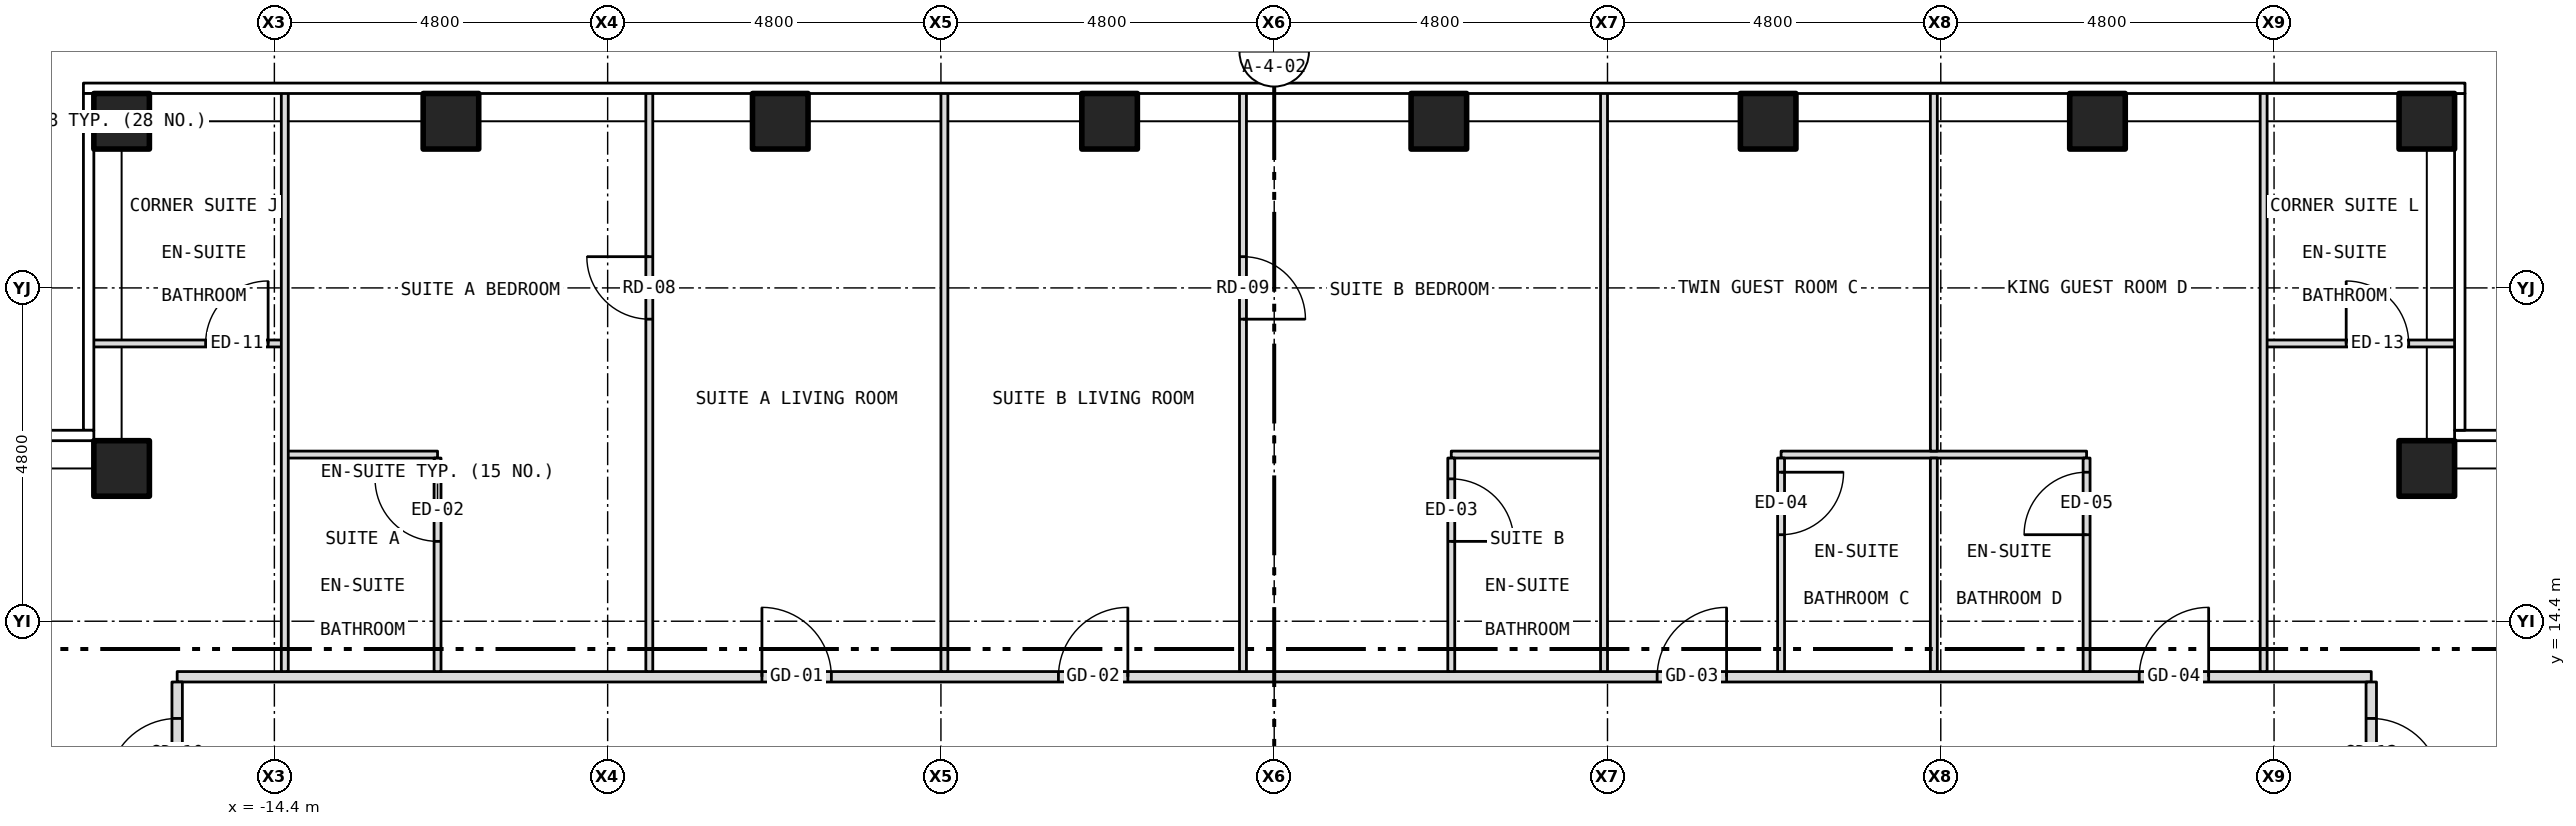
"""IFC4 building model, lengths in metres.
Left out: names, types, materials, properties, quantities, classifications, styles, units other than length and angle.
Written with IfcOpenShell. Run it as: python <this file> out.ifc"""

import sys

from ifc_helpers import new_model, si_unit, direction, frame, frame_2d, origin, origin_2d, place, context, subcontext, project, spatial, rectangle, hollow_rectangle, extrude, element, fill, save


model = new_model("IFC4")
c1 = context("Model", 3, precision=1e-05, world=origin(), true_north=direction((0.0, 1.0)))
c2 = subcontext(c1, "Body", "Model", "MODEL_VIEW")
j1 = project(units=[si_unit("LENGTHUNIT", "METRE"), si_unit("PLANEANGLEUNIT", "RADIAN")], contexts=[c1])
p1 = place(None, origin())
s1 = spatial("IfcSite", under=j1, at=p1, CompositionType="ELEMENT")
p2 = place(p1, origin())
s2 = spatial("IfcBuilding", under=s1, at=p2, CompositionType="ELEMENT")
p3 = place(p2, frame((0.0, 0.0, 162.0)))
s3 = spatial("IfcBuildingStorey", under=s2, at=p3, CompositionType="ELEMENT", Elevation=162.0)
for number, where, z_axis, x_axis in (
    (1, (-16.6, 21.6, -0.15), (0.0, 0.0, 1.0), (1.0, 0.0, 0.0)),
    (2, (-11.857, 21.6, -0.15), (0.0, 0.0, 1.0), (1.0, 0.0, 0.0)),
    (3, (-7.114, 21.6, -0.15), (0.0, 0.0, 1.0), (1.0, 0.0, 0.0)),
    (4, (-2.371, 21.6, -0.15), (0.0, 0.0, 1.0), (1.0, 0.0, 0.0)),
    (5, (2.371, 21.6, -0.15), (0.0, 0.0, 1.0), (1.0, 0.0, 0.0)),
    (6, (7.114, 21.6, -0.15), (0.0, 0.0, 1.0), (1.0, 0.0, 0.0)),
    (7, (11.857, 21.6, -0.15), (0.0, 0.0, 1.0), (1.0, 0.0, 0.0)),
    (8, (16.6, 21.6, -0.15), (0.0, 0.0, 1.0), (1.0, 0.0, 0.0)),
    (9, (-16.6, 16.6, -0.15), (0.0, 0.0, 1.0), (1.0, 0.0, 0.0)),
    (10, (16.6, 16.6, -0.15), (0.0, 0.0, 1.0), (1.0, 0.0, 0.0)),
):
    element("IfcColumn", number, at=place(p3, frame(where, z_axis=z_axis, x_axis=x_axis)), inside=s3, PredefinedType="COLUMN", context=c2, shape_type="SweptSolid", body=[
        extrude(hollow_rectangle(XDim=0.8, YDim=0.8, WallThickness=0.045, at=origin_2d()), origin(), (0.0, 0.0, 1.0), 3.5),
    ])
p4 = place(p3, frame((-15.8, 13.6, 0.0), z_axis=(0.0, 0.0, 1.0), x_axis=(1.0, 0.0, 0.0)))
e11 = element("IfcWall", 11, at=p4, inside=s3, PredefinedType="PARTITIONING", context=c2, shape_type="SweptSolid", body=[
    extrude(rectangle(XDim=31.6, YDim=0.15, at=frame_2d((15.8, 0.0))), origin(), (0.0, 0.0, 1.0), 3.35),
])
p5 = place(p4, frame((8.422, 0.0, 0.0)))
e12 = element("IfcOpeningElement", 12, at=p5, cuts=e11, PredefinedType="OPENING", context=c2, shape_type="SweptSolid", body=[
    extrude(rectangle(XDim=1.0, YDim=2.1, at=frame_2d((0.5, 1.05))), frame((0.0, 0.087, 0.0), z_axis=(0.0, -1.0, 0.0), x_axis=(1.0, 0.0, 0.0)), (0.0, 0.0, 1.0), 0.174),
])
p6 = place(p4, frame((12.692, 0.0, 0.0)))
e13 = element("IfcOpeningElement", 13, at=p6, cuts=e11, PredefinedType="OPENING", context=c2, shape_type="SweptSolid", body=[
    extrude(rectangle(XDim=1.0, YDim=2.1, at=frame_2d((0.5, 1.05))), frame((0.0, 0.087, 0.0), z_axis=(0.0, -1.0, 0.0), x_axis=(1.0, 0.0, 0.0)), (0.0, 0.0, 1.0), 0.174),
])
p7 = place(p4, frame((21.315, 0.0, 0.0)))
e14 = element("IfcOpeningElement", 14, at=p7, cuts=e11, PredefinedType="OPENING", context=c2, shape_type="SweptSolid", body=[
    extrude(rectangle(XDim=1.0, YDim=2.1, at=frame_2d((0.5, 1.05))), frame((0.0, 0.087, 0.0), z_axis=(0.0, -1.0, 0.0), x_axis=(1.0, 0.0, 0.0)), (0.0, 0.0, 1.0), 0.174),
])
p8 = place(p4, frame((28.258, 0.0, 0.0)))
e15 = element("IfcOpeningElement", 15, at=p8, cuts=e11, PredefinedType="OPENING", context=c2, shape_type="SweptSolid", body=[
    extrude(rectangle(XDim=1.0, YDim=2.1, at=frame_2d((0.5, 1.05))), frame((0.0, 0.087, 0.0), z_axis=(0.0, -1.0, 0.0), x_axis=(1.0, 0.0, 0.0)), (0.0, 0.0, 1.0), 0.174),
])
for number, where, z_axis, x_axis in (
    (16, (-14.25, 16.8, 0.0), (0.0, 0.0, 1.0), (1.0, 0.0, 0.0)),
    (17, (2.55, 16.8, 0.0), (0.0, 0.0, 1.0), (1.0, 0.0, 0.0)),
):
    element("IfcWall", number, at=place(p3, frame(where, z_axis=z_axis, x_axis=x_axis)), inside=s3, PredefinedType="PARTITIONING", context=c2, shape_type="SweptSolid", body=[
        extrude(rectangle(XDim=2.2, YDim=0.1, at=frame_2d((1.1, 0.0))), origin(), (0.0, 0.0, 1.0), 3.35),
    ])
p9 = place(p3, frame((7.3, 16.8, 0.0), z_axis=(0.0, 0.0, 1.0), x_axis=(1.0, 0.0, 0.0)))
e18 = element("IfcWall", 18, at=p9, inside=s3, PredefinedType="PARTITIONING", context=c2, shape_type="SweptSolid", body=[
    extrude(rectangle(XDim=4.4, YDim=0.1, at=frame_2d((2.2, 0.0))), origin(), (0.0, 0.0, 1.0), 3.35),
])
p10 = place(p3, frame((-17.03, 18.4, 0.0), z_axis=(0.0, 0.0, 1.0), x_axis=(1.0, 0.0, 0.0)))
e19 = element("IfcWall", 19, at=p10, inside=s3, PredefinedType="PARTITIONING", context=c2, shape_type="SweptSolid", body=[
    extrude(rectangle(XDim=2.78, YDim=0.1, at=frame_2d((1.39, 0.0))), origin(), (0.0, 0.0, 1.0), 3.35),
])
p11 = place(p10, frame((1.64, 0.0, 0.0)))
e20 = element("IfcOpeningElement", 20, at=p11, cuts=e19, PredefinedType="OPENING", context=c2, shape_type="SweptSolid", body=[
    extrude(rectangle(XDim=0.9, YDim=2.1, at=frame_2d((0.45, 1.05))), frame((0.0, 0.062, 0.0), z_axis=(0.0, -1.0, 0.0), x_axis=(1.0, 0.0, 0.0)), (0.0, 0.0, 1.0), 0.124),
])
p12 = place(p3, frame((14.25, 18.4, 0.0), z_axis=(0.0, 0.0, 1.0), x_axis=(1.0, 0.0, 0.0)))
e21 = element("IfcWall", 21, at=p12, inside=s3, PredefinedType="PARTITIONING", context=c2, shape_type="SweptSolid", body=[
    extrude(rectangle(XDim=2.78, YDim=0.1, at=frame_2d((1.39, 0.0))), origin(), (0.0, 0.0, 1.0), 3.35),
])
p13 = place(p12, frame((1.189, 0.0, 0.0)))
e22 = element("IfcOpeningElement", 22, at=p13, cuts=e21, PredefinedType="OPENING", context=c2, shape_type="SweptSolid", body=[
    extrude(rectangle(XDim=0.9, YDim=2.1, at=frame_2d((0.45, 1.05))), frame((0.0, 0.062, 0.0), z_axis=(0.0, -1.0, 0.0), x_axis=(1.0, 0.0, 0.0)), (0.0, 0.0, 1.0), 0.124),
])
p14 = place(p3, frame((-15.8, 10.92, 0.0), z_axis=(0.0, 0.0, 1.0), x_axis=(0.0, 1.0, 0.0)))
e23 = element("IfcWall", 23, at=p14, inside=s3, PredefinedType="PARTITIONING", context=c2, shape_type="SweptSolid", body=[
    extrude(rectangle(XDim=2.605, YDim=0.15, at=frame_2d((1.302, 0.0))), origin(), (0.0, 0.0, 1.0), 3.35),
])
p15 = place(p14, frame((1.08, 0.0, 0.0)))
e24 = element("IfcOpeningElement", 24, at=p15, cuts=e23, PredefinedType="OPENING", context=c2, shape_type="SweptSolid", body=[
    extrude(rectangle(XDim=1.0, YDim=2.1, at=frame_2d((0.5, 1.05))), frame((0.0, 0.087, 0.0), z_axis=(0.0, -1.0, 0.0), x_axis=(1.0, 0.0, 0.0)), (0.0, 0.0, 1.0), 0.174),
])
p16 = place(p3, frame((-14.25, 13.675, 0.0), z_axis=(0.0, 0.0, 1.0), x_axis=(0.0, 1.0, 0.0)))
e25 = element("IfcWall", 25, at=p16, inside=s3, PredefinedType="PARTITIONING", context=c2, shape_type="SweptSolid", body=[
    extrude(rectangle(XDim=8.355, YDim=0.1, at=frame_2d((4.177, 0.0))), origin(), (0.0, 0.0, 1.0), 2.817),
])
p17 = place(p3, frame((-12.05, 13.675, 0.0), z_axis=(0.0, 0.0, 1.0), x_axis=(0.0, 1.0, 0.0)))
e26 = element("IfcWall", 26, at=p17, inside=s3, PredefinedType="PARTITIONING", context=c2, shape_type="SweptSolid", body=[
    extrude(rectangle(XDim=3.075, YDim=0.1, at=frame_2d((1.538, 0.0))), origin(), (0.0, 0.0, 1.0), 3.35),
])
p18 = place(p17, frame((1.875, 0.0, 0.0)))
e27 = element("IfcOpeningElement", 27, at=p18, cuts=e26, PredefinedType="OPENING", context=c2, shape_type="SweptSolid", body=[
    extrude(rectangle(XDim=0.9, YDim=2.1, at=frame_2d((0.45, 1.05))), frame((0.0, 0.062, 0.0), z_axis=(0.0, -1.0, 0.0), x_axis=(1.0, 0.0, 0.0)), (0.0, 0.0, 1.0), 0.124),
])
p19 = place(p3, frame((-9.0, 13.675, 0.0), z_axis=(0.0, 0.0, 1.0), x_axis=(0.0, 1.0, 0.0)))
e28 = element("IfcWall", 28, at=p19, inside=s3, PredefinedType="PARTITIONING", context=c2, shape_type="SweptSolid", body=[
    extrude(rectangle(XDim=8.355, YDim=0.1, at=frame_2d((4.177, 0.0))), origin(), (0.0, 0.0, 1.0), 3.35),
])
p20 = place(p19, frame((5.075, 0.0, 0.0)))
e29 = element("IfcOpeningElement", 29, at=p20, cuts=e28, PredefinedType="OPENING", context=c2, shape_type="SweptSolid", body=[
    extrude(rectangle(XDim=0.9, YDim=2.1, at=frame_2d((0.45, 1.05))), frame((0.0, 0.062, 0.0), z_axis=(0.0, -1.0, 0.0), x_axis=(1.0, 0.0, 0.0)), (0.0, 0.0, 1.0), 0.124),
])
p21 = place(p3, frame((-4.75, 13.675, 0.0), z_axis=(0.0, 0.0, 1.0), x_axis=(0.0, 1.0, 0.0)))
e30 = element("IfcWall", 30, at=p21, inside=s3, PredefinedType="PARTITIONING", context=c2, shape_type="SweptSolid", body=[
    extrude(rectangle(XDim=8.355, YDim=0.1, at=frame_2d((4.177, 0.0))), origin(), (0.0, 0.0, 1.0), 2.817),
])
p22 = place(p3, frame((-0.45, 13.675, 0.0), z_axis=(0.0, 0.0, 1.0), x_axis=(0.0, 1.0, 0.0)))
e31 = element("IfcWall", 31, at=p22, inside=s3, PredefinedType="PARTITIONING", context=c2, shape_type="SweptSolid", body=[
    extrude(rectangle(XDim=8.355, YDim=0.1, at=frame_2d((4.177, 0.0))), origin(), (0.0, 0.0, 1.0), 3.35),
])
p23 = place(p22, frame((5.075, 0.0, 0.0)))
e32 = element("IfcOpeningElement", 32, at=p23, cuts=e31, PredefinedType="OPENING", context=c2, shape_type="SweptSolid", body=[
    extrude(rectangle(XDim=0.9, YDim=2.1, at=frame_2d((0.45, 1.05))), frame((0.0, 0.062, 0.0), z_axis=(0.0, -1.0, 0.0), x_axis=(1.0, 0.0, 0.0)), (0.0, 0.0, 1.0), 0.124),
])
p24 = place(p3, frame((2.55, 13.675, 0.0), z_axis=(0.0, 0.0, 1.0), x_axis=(0.0, 1.0, 0.0)))
e33 = element("IfcWall", 33, at=p24, inside=s3, PredefinedType="PARTITIONING", context=c2, shape_type="SweptSolid", body=[
    extrude(rectangle(XDim=3.075, YDim=0.1, at=frame_2d((1.538, 0.0))), origin(), (0.0, 0.0, 1.0), 3.35),
])
p25 = place(p24, frame((1.875, 0.0, 0.0)))
e34 = element("IfcOpeningElement", 34, at=p25, cuts=e33, PredefinedType="OPENING", context=c2, shape_type="SweptSolid", body=[
    extrude(rectangle(XDim=0.9, YDim=2.1, at=frame_2d((0.45, 1.05))), frame((0.0, 0.062, 0.0), z_axis=(0.0, -1.0, 0.0), x_axis=(1.0, 0.0, 0.0)), (0.0, 0.0, 1.0), 0.124),
])
p26 = place(p3, frame((4.75, 13.675, 0.0), z_axis=(0.0, 0.0, 1.0), x_axis=(0.0, 1.0, 0.0)))
e35 = element("IfcWall", 35, at=p26, inside=s3, PredefinedType="PARTITIONING", context=c2, shape_type="SweptSolid", body=[
    extrude(rectangle(XDim=8.355, YDim=0.1, at=frame_2d((4.177, 0.0))), origin(), (0.0, 0.0, 1.0), 2.817),
])
p27 = place(p3, frame((7.3, 13.675, 0.0), z_axis=(0.0, 0.0, 1.0), x_axis=(0.0, 1.0, 0.0)))
e36 = element("IfcWall", 36, at=p27, inside=s3, PredefinedType="PARTITIONING", context=c2, shape_type="SweptSolid", body=[
    extrude(rectangle(XDim=3.075, YDim=0.1, at=frame_2d((1.538, 0.0))), origin(), (0.0, 0.0, 1.0), 3.35),
])
p28 = place(p27, frame((1.971, 0.0, 0.0)))
e37 = element("IfcOpeningElement", 37, at=p28, cuts=e36, PredefinedType="OPENING", context=c2, shape_type="SweptSolid", body=[
    extrude(rectangle(XDim=0.9, YDim=2.1, at=frame_2d((0.45, 1.05))), frame((0.0, 0.062, 0.0), z_axis=(0.0, -1.0, 0.0), x_axis=(1.0, 0.0, 0.0)), (0.0, 0.0, 1.0), 0.124),
])
p29 = place(p3, frame((9.5, 13.675, 0.0), z_axis=(0.0, 0.0, 1.0), x_axis=(0.0, 1.0, 0.0)))
e38 = element("IfcWall", 38, at=p29, inside=s3, PredefinedType="PARTITIONING", context=c2, shape_type="SweptSolid", body=[
    extrude(rectangle(XDim=3.075, YDim=0.1, at=frame_2d((1.538, 0.0))), origin(), (0.0, 0.0, 1.0), 2.728),
])
p30 = place(p3, frame((9.5, 16.85, 0.0), z_axis=(0.0, 0.0, 1.0), x_axis=(0.0, 1.0, 0.0)))
e39 = element("IfcWall", 39, at=p30, inside=s3, PredefinedType="PARTITIONING", context=c2, shape_type="SweptSolid", body=[
    extrude(rectangle(XDim=5.18, YDim=0.1, at=frame_2d((2.59, 0.0))), origin(), (0.0, 0.0, 1.0), 2.728),
])
p31 = place(p3, frame((11.7, 13.675, 0.0), z_axis=(0.0, 0.0, 1.0), x_axis=(0.0, 1.0, 0.0)))
e40 = element("IfcWall", 40, at=p31, inside=s3, PredefinedType="PARTITIONING", context=c2, shape_type="SweptSolid", body=[
    extrude(rectangle(XDim=3.075, YDim=0.1, at=frame_2d((1.538, 0.0))), origin(), (0.0, 0.0, 1.0), 3.35),
])
p32 = place(p31, frame((1.971, 0.0, 0.0)))
e41 = element("IfcOpeningElement", 41, at=p32, cuts=e40, PredefinedType="OPENING", context=c2, shape_type="SweptSolid", body=[
    extrude(rectangle(XDim=0.9, YDim=2.1, at=frame_2d((0.45, 1.05))), frame((0.0, 0.062, 0.0), z_axis=(0.0, -1.0, 0.0), x_axis=(1.0, 0.0, 0.0)), (0.0, 0.0, 1.0), 0.124),
])
p33 = place(p3, frame((14.25, 13.675, 0.0), z_axis=(0.0, 0.0, 1.0), x_axis=(0.0, 1.0, 0.0)))
e42 = element("IfcWall", 42, at=p33, inside=s3, PredefinedType="PARTITIONING", context=c2, shape_type="SweptSolid", body=[
    extrude(rectangle(XDim=8.355, YDim=0.1, at=frame_2d((4.177, 0.0))), origin(), (0.0, 0.0, 1.0), 2.817),
])
p34 = place(p3, frame((15.8, 10.92, 0.0), z_axis=(0.0, 0.0, 1.0), x_axis=(0.0, 1.0, 0.0)))
e43 = element("IfcWall", 43, at=p34, inside=s3, PredefinedType="PARTITIONING", context=c2, shape_type="SweptSolid", body=[
    extrude(rectangle(XDim=2.605, YDim=0.15, at=frame_2d((1.302, 0.0))), origin(), (0.0, 0.0, 1.0), 3.35),
])
p35 = place(p34, frame((1.08, 0.0, 0.0)))
e44 = element("IfcOpeningElement", 44, at=p35, cuts=e43, PredefinedType="OPENING", context=c2, shape_type="SweptSolid", body=[
    extrude(rectangle(XDim=1.0, YDim=2.1, at=frame_2d((0.5, 1.05))), frame((0.0, 0.087, 0.0), z_axis=(0.0, -1.0, 0.0), x_axis=(1.0, 0.0, 0.0)), (0.0, 0.0, 1.0), 0.174),
])
p36 = place(p5, origin())
e45 = element("IfcDoor", 45, at=p36, inside=s3, OperationType="SINGLE_SWING_LEFT", PredefinedType="DOOR", context=c2, shape_type="SweptSolid", body=[
    extrude(rectangle(XDim=1.0, YDim=2.1, at=frame_2d((0.5, 1.05))), frame((0.0, 0.025, 0.0), z_axis=(0.0, -1.0, 0.0), x_axis=(1.0, 0.0, 0.0)), (0.0, 0.0, 1.0), 0.05),
])
fill(e12, e45)
p37 = place(p20, origin())
e46 = element("IfcDoor", 46, at=p37, inside=s3, OperationType="SINGLE_SWING_RIGHT", PredefinedType="DOOR", context=c2, shape_type="SweptSolid", body=[
    extrude(rectangle(XDim=0.9, YDim=2.1, at=frame_2d((0.45, 1.05))), frame((0.0, 0.025, 0.0), z_axis=(0.0, -1.0, 0.0), x_axis=(1.0, 0.0, 0.0)), (0.0, 0.0, 1.0), 0.05),
])
fill(e29, e46)
p38 = place(p18, origin())
e47 = element("IfcDoor", 47, at=p38, inside=s3, OperationType="SINGLE_SWING_RIGHT", PredefinedType="DOOR", context=c2, shape_type="SweptSolid", body=[
    extrude(rectangle(XDim=0.9, YDim=2.1, at=frame_2d((0.45, 1.05))), frame((0.0, 0.025, 0.0), z_axis=(0.0, -1.0, 0.0), x_axis=(1.0, 0.0, 0.0)), (0.0, 0.0, 1.0), 0.05),
])
fill(e27, e47)
p39 = place(p6, origin())
e48 = element("IfcDoor", 48, at=p39, inside=s3, OperationType="SINGLE_SWING_RIGHT", PredefinedType="DOOR", context=c2, shape_type="SweptSolid", body=[
    extrude(rectangle(XDim=1.0, YDim=2.1, at=frame_2d((0.5, 1.05))), frame((0.0, 0.025, 0.0), z_axis=(0.0, -1.0, 0.0), x_axis=(1.0, 0.0, 0.0)), (0.0, 0.0, 1.0), 0.05),
])
fill(e13, e48)
p40 = place(p23, origin())
e49 = element("IfcDoor", 49, at=p40, inside=s3, OperationType="SINGLE_SWING_LEFT", PredefinedType="DOOR", context=c2, shape_type="SweptSolid", body=[
    extrude(rectangle(XDim=0.9, YDim=2.1, at=frame_2d((0.45, 1.05))), frame((0.0, 0.025, 0.0), z_axis=(0.0, -1.0, 0.0), x_axis=(1.0, 0.0, 0.0)), (0.0, 0.0, 1.0), 0.05),
])
fill(e32, e49)
p41 = place(p25, origin())
e50 = element("IfcDoor", 50, at=p41, inside=s3, OperationType="SINGLE_SWING_LEFT", PredefinedType="DOOR", context=c2, shape_type="SweptSolid", body=[
    extrude(rectangle(XDim=0.9, YDim=2.1, at=frame_2d((0.45, 1.05))), frame((0.0, 0.025, 0.0), z_axis=(0.0, -1.0, 0.0), x_axis=(1.0, 0.0, 0.0)), (0.0, 0.0, 1.0), 0.05),
])
fill(e34, e50)
p42 = place(p7, origin())
e51 = element("IfcDoor", 51, at=p42, inside=s3, OperationType="SINGLE_SWING_RIGHT", PredefinedType="DOOR", context=c2, shape_type="SweptSolid", body=[
    extrude(rectangle(XDim=1.0, YDim=2.1, at=frame_2d((0.5, 1.05))), frame((0.0, 0.025, 0.0), z_axis=(0.0, -1.0, 0.0), x_axis=(1.0, 0.0, 0.0)), (0.0, 0.0, 1.0), 0.05),
])
fill(e14, e51)
p43 = place(p28, origin())
e52 = element("IfcDoor", 52, at=p43, inside=s3, OperationType="SINGLE_SWING_RIGHT", PredefinedType="DOOR", context=c2, shape_type="SweptSolid", body=[
    extrude(rectangle(XDim=0.9, YDim=2.1, at=frame_2d((0.45, 1.05))), frame((0.0, 0.025, 0.0), z_axis=(0.0, -1.0, 0.0), x_axis=(1.0, 0.0, 0.0)), (0.0, 0.0, 1.0), 0.05),
])
fill(e37, e52)
p44 = place(p8, origin())
e53 = element("IfcDoor", 53, at=p44, inside=s3, OperationType="SINGLE_SWING_RIGHT", PredefinedType="DOOR", context=c2, shape_type="SweptSolid", body=[
    extrude(rectangle(XDim=1.0, YDim=2.1, at=frame_2d((0.5, 1.05))), frame((0.0, 0.025, 0.0), z_axis=(0.0, -1.0, 0.0), x_axis=(1.0, 0.0, 0.0)), (0.0, 0.0, 1.0), 0.05),
])
fill(e15, e53)
p45 = place(p32, origin())
e54 = element("IfcDoor", 54, at=p45, inside=s3, OperationType="SINGLE_SWING_LEFT", PredefinedType="DOOR", context=c2, shape_type="SweptSolid", body=[
    extrude(rectangle(XDim=0.9, YDim=2.1, at=frame_2d((0.45, 1.05))), frame((0.0, 0.025, 0.0), z_axis=(0.0, -1.0, 0.0), x_axis=(1.0, 0.0, 0.0)), (0.0, 0.0, 1.0), 0.05),
])
fill(e41, e54)
p46 = place(p11, origin())
e55 = element("IfcDoor", 55, at=p46, inside=s3, OperationType="SINGLE_SWING_RIGHT", PredefinedType="DOOR", context=c2, shape_type="SweptSolid", body=[
    extrude(rectangle(XDim=0.9, YDim=2.1, at=frame_2d((0.45, 1.05))), frame((0.0, 0.025, 0.0), z_axis=(0.0, -1.0, 0.0), x_axis=(1.0, 0.0, 0.0)), (0.0, 0.0, 1.0), 0.05),
])
fill(e20, e55)
p47 = place(p15, origin())
e56 = element("IfcDoor", 56, at=p47, inside=s3, OperationType="SINGLE_SWING_LEFT", PredefinedType="DOOR", context=c2, shape_type="SweptSolid", body=[
    extrude(rectangle(XDim=1.0, YDim=2.1, at=frame_2d((0.5, 1.05))), frame((0.0, 0.025, 0.0), z_axis=(0.0, -1.0, 0.0), x_axis=(1.0, 0.0, 0.0)), (0.0, 0.0, 1.0), 0.05),
])
fill(e24, e56)
p48 = place(p13, origin())
e57 = element("IfcDoor", 57, at=p48, inside=s3, OperationType="SINGLE_SWING_LEFT", PredefinedType="DOOR", context=c2, shape_type="SweptSolid", body=[
    extrude(rectangle(XDim=0.9, YDim=2.1, at=frame_2d((0.45, 1.05))), frame((0.0, 0.025, 0.0), z_axis=(0.0, -1.0, 0.0), x_axis=(1.0, 0.0, 0.0)), (0.0, 0.0, 1.0), 0.05),
])
fill(e22, e57)
p49 = place(p35, origin())
e58 = element("IfcDoor", 58, at=p49, inside=s3, OperationType="SINGLE_SWING_LEFT", PredefinedType="DOOR", context=c2, shape_type="SweptSolid", body=[
    extrude(rectangle(XDim=1.0, YDim=2.1, at=frame_2d((0.5, 1.05))), frame((0.0, 0.025, 0.0), z_axis=(0.0, -1.0, 0.0), x_axis=(1.0, 0.0, 0.0)), (0.0, 0.0, 1.0), 0.05),
])
fill(e44, e58)
save(model, sys.argv[1])
